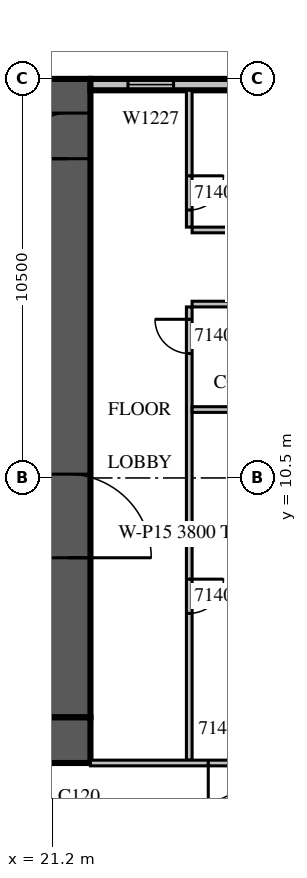
"""IFC4 building model, lengths in metres.
Left out: names, types, materials, properties, quantities, classifications, styles, units other than length and angle.
Written with IfcOpenShell. Run it as: python <this file> out.ifc"""

import sys

from ifc_helpers import new_model, si_unit, direction, frame, frame_2d, origin, place, context, subcontext, project, spatial, rectangle, extrude, source, transform, mapped, element, fill, save


model = new_model("IFC4")
c1 = context("Model", 3, precision=1e-05, world=origin(), true_north=direction((0.0, 1.0)))
c2 = subcontext(c1, "Body", "Model", "MODEL_VIEW")
j1 = project(units=[si_unit("LENGTHUNIT", "METRE"), si_unit("PLANEANGLEUNIT", "RADIAN")], contexts=[c1])
p1 = place(None, origin())
s1 = spatial("IfcSite", under=j1, at=p1, CompositionType="ELEMENT")
p2 = place(p1, origin())
s2 = spatial("IfcBuilding", under=s1, at=p2, CompositionType="ELEMENT")
p3 = place(p2, frame((0.0, 0.0, 69.9)))
s3 = spatial("IfcBuildingStorey", under=s2, at=p3, CompositionType="ELEMENT", Elevation=69.9)
m1 = source(origin(), c2, "Body", "SweptSolid", [
    extrude(rectangle(XDim=16.8, YDim=1.2, at=frame_2d((8.4, 0.0))), origin(), (0.0, 0.0, 1.0), 4.2),
])
p4 = place(p3, frame((21.6, 4.2, 0.0), z_axis=(0.0, 0.0, 1.0), x_axis=(0.0, 1.0, 0.0)))
e1 = element("IfcWall", 1, at=p4, inside=s3, PredefinedType="SHEAR", context=c2, shape_type="MappedRepresentation", body=[
    mapped(m1, transform((0.0, 0.0, 0.0), scale=1.0)),
])
m2 = source(origin(), c2, "Body", "SweptSolid", [
    extrude(rectangle(XDim=2.2, YDim=2.1, at=frame_2d((1.1, 1.05))), frame((0.0, 0.61, 0.0), z_axis=(0.0, -1.0, 0.0), x_axis=(1.0, 0.0, 0.0)), (0.0, 0.0, 1.0), 1.22),
])
p5 = place(p4, frame((4.2, 0.0, 0.0)))
e2 = element("IfcOpeningElement", 2, at=p5, cuts=e1, PredefinedType="OPENING", context=c2, shape_type="MappedRepresentation", body=[
    mapped(m2, transform((0.0, 0.0, 0.0), scale=1.0)),
])
m3 = source(origin(), c2, "Body", "SweptSolid", [
    extrude(rectangle(XDim=1.2, YDim=2.1, at=frame_2d((0.6, 1.05))), frame((0.0, 0.61, 0.0), z_axis=(0.0, -1.0, 0.0), x_axis=(1.0, 0.0, 0.0)), (0.0, 0.0, 1.0), 1.22),
])
p6 = place(p4, frame((14.7, 0.0, 0.0)))
e3 = element("IfcOpeningElement", 3, at=p6, cuts=e1, PredefinedType="OPENING", context=c2, shape_type="MappedRepresentation", body=[
    mapped(m3, transform((0.0, 0.0, 0.0), scale=1.0)),
])
m4 = source(origin(), c2, "Body", "SweptSolid", [
    extrude(rectangle(XDim=18.0, YDim=1.2, at=frame_2d((9.0, 0.0))), origin(), (0.0, 0.0, 1.0), 4.2),
])
p7 = place(p3, frame((4.2, 3.6, 0.0), z_axis=(0.0, 0.0, 1.0), x_axis=(1.0, 0.0, 0.0)))
e4 = element("IfcWall", 4, at=p7, inside=s3, PredefinedType="SHEAR", context=c2, shape_type="MappedRepresentation", body=[
    mapped(m4, transform((0.0, 0.0, 0.0), scale=1.0)),
])
m5 = source(origin(), c2, "Body", "SweptSolid", [
    extrude(rectangle(XDim=6.6, YDim=0.3, at=frame_2d((3.3, 0.0))), origin(), (0.0, 0.0, 1.0), 3.8),
])
p8 = place(p3, frame((28.8, 20.85, 0.0), z_axis=(0.0, 0.0, 1.0), x_axis=(-1.0, 0.0, 0.0)))
e5 = element("IfcWall", 5, at=p8, inside=s3, PredefinedType="STANDARD", context=c2, shape_type="MappedRepresentation", body=[
    mapped(m5, transform((0.0, 0.0, 0.0), scale=1.0)),
])
m6 = source(origin(), c2, "Body", "SweptSolid", [
    extrude(rectangle(XDim=2.4, YDim=2.7, at=frame_2d((1.2, 1.35))), frame((0.0, 0.16, 0.0), z_axis=(0.0, -1.0, 0.0), x_axis=(1.0, 0.0, 0.0)), (0.0, 0.0, 1.0), 0.32),
])
p9 = place(p8, frame((0.3, 0.0, 0.6)))
e6 = element("IfcOpeningElement", 6, at=p9, cuts=e5, PredefinedType="OPENING", context=c2, shape_type="MappedRepresentation", body=[
    mapped(m6, transform((0.0, 0.0, 0.0), scale=1.0)),
])
m7 = source(origin(), c2, "Body", "SweptSolid", [
    extrude(rectangle(XDim=1.2, YDim=2.7, at=frame_2d((0.6, 1.35))), frame((0.0, 0.16, 0.0), z_axis=(0.0, -1.0, 0.0), x_axis=(1.0, 0.0, 0.0)), (0.0, 0.0, 1.0), 0.32),
])
p10 = place(p8, frame((4.412, 0.0, 0.6)))
e7 = element("IfcOpeningElement", 7, at=p10, cuts=e5, PredefinedType="OPENING", context=c2, shape_type="MappedRepresentation", body=[
    mapped(m7, transform((0.0, 0.0, 0.0), scale=1.0)),
])
m8 = source(origin(), c2, "Body", "SweptSolid", [
    extrude(rectangle(XDim=11.925, YDim=0.15, at=frame_2d((5.963, 0.0))), origin(), (0.0, 0.0, 1.0), 3.8),
])
p11 = place(p3, frame((24.8, 15.0, 0.0), z_axis=(0.0, 0.0, 1.0), x_axis=(0.0, -1.0, 0.0)))
e8 = element("IfcWall", 8, at=p11, inside=s3, PredefinedType="PARTITIONING", context=c2, shape_type="MappedRepresentation", body=[
    mapped(m8, transform((0.0, 0.0, 0.0), scale=1.0)),
])
m9 = source(origin(), c2, "Body", "SweptSolid", [
    extrude(rectangle(XDim=0.9, YDim=2.1, at=frame_2d((0.45, 1.05))), frame((0.0, 0.085, 0.0), z_axis=(0.0, -1.0, 0.0), x_axis=(1.0, 0.0, 0.0)), (0.0, 0.0, 1.0), 0.17),
])
p12 = place(p11, frame((7.162, 0.0, 0.0)))
e9 = element("IfcOpeningElement", 9, at=p12, cuts=e8, PredefinedType="OPENING", context=c2, shape_type="MappedRepresentation", body=[
    mapped(m9, transform((0.0, 0.0, 0.0), scale=1.0)),
])
p13 = place(p11, frame((0.325, 0.0, 0.0)))
e10 = element("IfcOpeningElement", 10, at=p13, cuts=e8, PredefinedType="OPENING", context=c2, shape_type="MappedRepresentation", body=[
    mapped(m9, transform((0.0, 0.0, 0.0), scale=1.0)),
])
m10 = source(origin(), c2, "Body", "SweptSolid", [
    extrude(rectangle(XDim=3.6, YDim=0.15, at=frame_2d((1.8, 0.0))), origin(), (0.0, 0.0, 1.0), 3.8),
])
p14 = place(p3, frame((24.8, 20.7, 0.0), z_axis=(0.0, 0.0, 1.0), x_axis=(0.0, -1.0, 0.0)))
e11 = element("IfcWall", 11, at=p14, inside=s3, PredefinedType="PARTITIONING", context=c2, shape_type="MappedRepresentation", body=[
    mapped(m10, transform((0.0, 0.0, 0.0), scale=1.0)),
])
p15 = place(p14, frame((2.25, 0.0, 0.0)))
e12 = element("IfcOpeningElement", 12, at=p15, cuts=e11, PredefinedType="OPENING", context=c2, shape_type="MappedRepresentation", body=[
    mapped(m9, transform((0.0, 0.0, 0.0), scale=1.0)),
])
m11 = source(origin(), c2, "Body", "SweptSolid", [
    extrude(rectangle(XDim=4.45, YDim=0.15, at=frame_2d((2.225, 0.0))), origin(), (0.0, 0.0, 1.0), 3.8),
])
for number, where, z_axis, x_axis in (
    (13, (29.325, 12.3, 0.0), (0.0, 0.0, 1.0), (-1.0, 0.0, 0.0)),
    (14, (29.325, 15.075, 0.0), (0.0, 0.0, 1.0), (-1.0, 0.0, 0.0)),
    (15, (24.875, 17.025, 0.0), (0.0, 0.0, 1.0), (1.0, 0.0, 0.0)),
):
    element("IfcWall", number, at=place(p3, frame(where, z_axis=z_axis, x_axis=x_axis)), inside=s3, PredefinedType="PARTITIONING", context=c2, shape_type="MappedRepresentation", body=[
        mapped(m11, transform((0.0, 0.0, 0.0), scale=1.0)),
    ])
m12 = source(origin(), c2, "Body", "SweptSolid", [
    extrude(rectangle(XDim=7.125, YDim=0.15, at=frame_2d((3.562, 0.0))), origin(), (0.0, 0.0, 1.0), 3.8),
])
p16 = place(p3, frame((22.2, 3.0, 0.0), z_axis=(0.0, 0.0, 1.0), x_axis=(1.0, 0.0, 0.0)))
e16 = element("IfcWall", 16, at=p16, inside=s3, PredefinedType="PARTITIONING", context=c2, shape_type="MappedRepresentation", body=[
    mapped(m12, transform((0.0, 0.0, 0.0), scale=1.0)),
])
m13 = source(origin(), c2, "Body", "SweptSolid", [
    extrude(rectangle(XDim=1.0, YDim=2.1, at=frame_2d((0.5, 1.05))), frame((0.0, 0.085, 0.0), z_axis=(0.0, -1.0, 0.0), x_axis=(1.0, 0.0, 0.0)), (0.0, 0.0, 1.0), 0.17),
])
p17 = place(p16, frame((3.1, 0.0, 0.0)))
e17 = element("IfcOpeningElement", 17, at=p17, cuts=e16, PredefinedType="OPENING", context=c2, shape_type="MappedRepresentation", body=[
    mapped(m13, transform((0.0, 0.0, 0.0), scale=1.0)),
])
p18 = place(p16, frame((4.162, 0.0, 0.0)))
e18 = element("IfcOpeningElement", 18, at=p18, cuts=e16, PredefinedType="OPENING", context=c2, shape_type="MappedRepresentation", body=[
    mapped(m9, transform((0.0, 0.0, 0.0), scale=1.0)),
])
m14 = source(origin(), c2, "Body", "SweptSolid", [
    extrude(rectangle(XDim=1.2, YDim=2.7, at=frame_2d((0.6, 1.35))), frame((0.0, 0.03, 0.0), z_axis=(0.0, -1.0, 0.0), x_axis=(1.0, 0.0, 0.0)), (0.0, 0.0, 1.0), 0.06),
])
p19 = place(p10, origin())
e19 = element("IfcWindow", 19, at=p19, inside=s3, PartitioningType="SINGLE_PANEL", PredefinedType="WINDOW", context=c2, shape_type="MappedRepresentation", body=[
    mapped(m14, transform((0.0, 0.0, 0.0), scale=1.0)),
])
fill(e7, e19)
m15 = source(origin(), c2, "Body", "SweptSolid", [
    extrude(rectangle(XDim=2.2, YDim=2.1, at=frame_2d((1.1, 1.05))), frame((0.0, 0.025, 0.0), z_axis=(0.0, -1.0, 0.0), x_axis=(1.0, 0.0, 0.0)), (0.0, 0.0, 1.0), 0.05),
])
p20 = place(p5, origin())
e20 = element("IfcDoor", 20, at=p20, inside=s3, OperationType="DOUBLE_DOOR_SINGLE_SWING", PredefinedType="DOOR", context=c2, shape_type="MappedRepresentation", body=[
    mapped(m15, transform((0.0, 0.0, 0.0), scale=1.0)),
])
fill(e2, e20)
m16 = source(origin(), c2, "Body", "SweptSolid", [
    extrude(rectangle(XDim=1.2, YDim=2.1, at=frame_2d((0.6, 1.05))), frame((0.0, 0.025, 0.0), z_axis=(0.0, -1.0, 0.0), x_axis=(1.0, 0.0, 0.0)), (0.0, 0.0, 1.0), 0.05),
])
p21 = place(p6, origin())
e21 = element("IfcDoor", 21, at=p21, inside=s3, OperationType="SINGLE_SWING_LEFT", PredefinedType="DOOR", context=c2, shape_type="MappedRepresentation", body=[
    mapped(m16, transform((0.0, 0.0, 0.0), scale=1.0)),
])
fill(e3, e21)
m17 = source(origin(), c2, "Body", "SweptSolid", [
    extrude(rectangle(XDim=0.9, YDim=2.1, at=frame_2d((0.45, 1.05))), frame((0.0, 0.025, 0.0), z_axis=(0.0, -1.0, 0.0), x_axis=(1.0, 0.0, 0.0)), (0.0, 0.0, 1.0), 0.05),
])
p22 = place(p12, origin())
e22 = element("IfcDoor", 22, at=p22, inside=s3, OperationType="SINGLE_SWING_LEFT", PredefinedType="DOOR", context=c2, shape_type="MappedRepresentation", body=[
    mapped(m17, transform((0.0, 0.0, 0.0), scale=1.0)),
])
fill(e9, e22)
p23 = place(p13, origin())
e23 = element("IfcDoor", 23, at=p23, inside=s3, OperationType="SINGLE_SWING_RIGHT", PredefinedType="DOOR", context=c2, shape_type="MappedRepresentation", body=[
    mapped(m17, transform((0.0, 0.0, 0.0), scale=1.0)),
])
fill(e10, e23)
p24 = place(p15, origin())
e24 = element("IfcDoor", 24, at=p24, inside=s3, OperationType="SINGLE_SWING_LEFT", PredefinedType="DOOR", context=c2, shape_type="MappedRepresentation", body=[
    mapped(m17, transform((0.0, 0.0, 0.0), scale=1.0)),
])
fill(e12, e24)
m18 = source(origin(), c2, "Body", "SweptSolid", [
    extrude(rectangle(XDim=1.0, YDim=2.1, at=frame_2d((0.5, 1.05))), frame((0.0, 0.025, 0.0), z_axis=(0.0, -1.0, 0.0), x_axis=(1.0, 0.0, 0.0)), (0.0, 0.0, 1.0), 0.05),
])
p25 = place(p17, origin())
e25 = element("IfcDoor", 25, at=p25, inside=s3, OperationType="SINGLE_SWING_RIGHT", PredefinedType="DOOR", context=c2, shape_type="MappedRepresentation", body=[
    mapped(m18, transform((0.0, 0.0, 0.0), scale=1.0)),
])
fill(e17, e25)
save(model, sys.argv[1])
